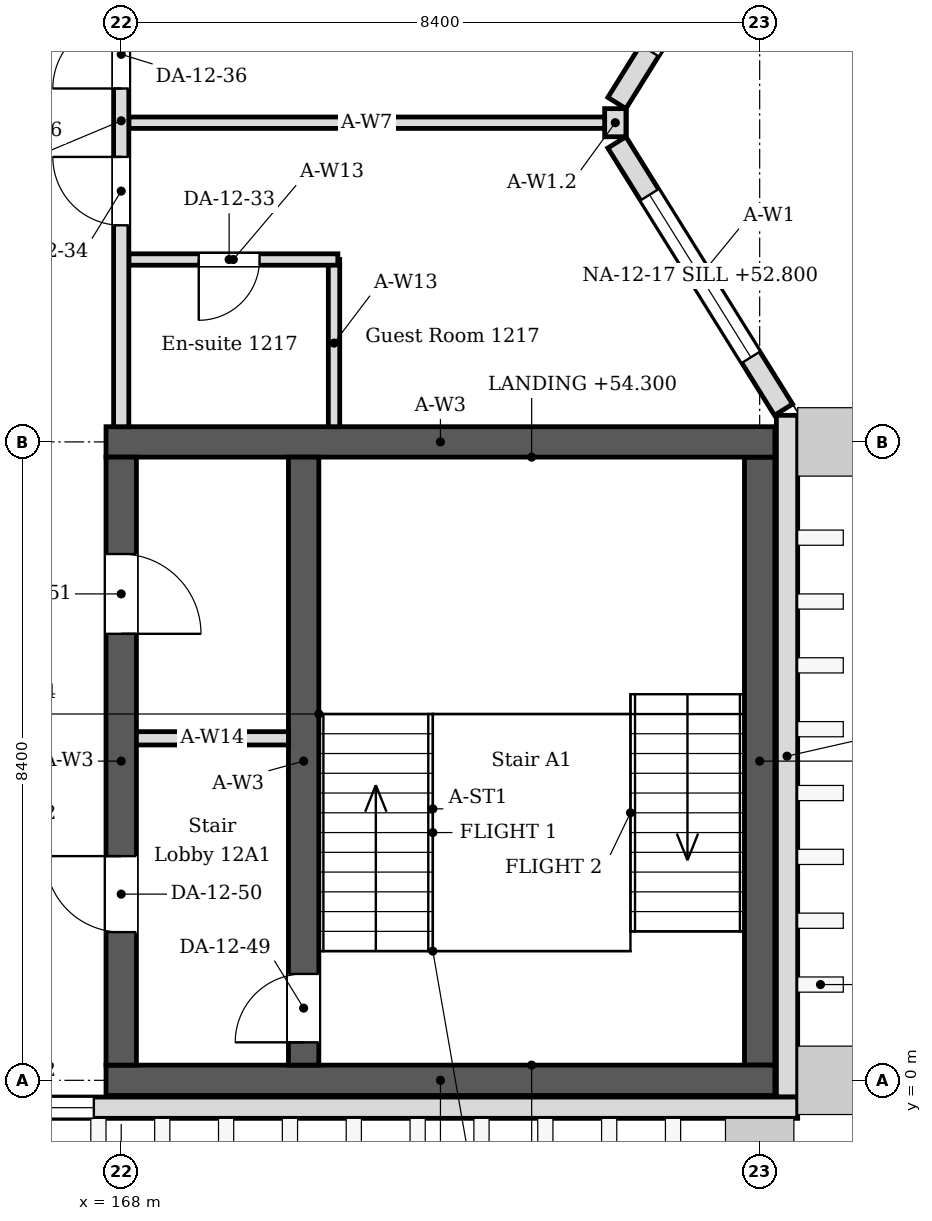
"""IFC4 building model, lengths in metres.
Left out: names, types, materials, properties, quantities, classifications, styles, units other than length and angle.
Written with IfcOpenShell. Run it as: python <this file> out.ifc"""

import sys

from ifc_helpers import new_model, si_unit, direction, frame, frame_2d, origin, place, context, subcontext, project, spatial, rectangle, extrude, element, fill, save


model = new_model("IFC4")
c1 = context("Model", 3, precision=1e-05, world=origin(), true_north=direction((0.0, 1.0)))
c2 = subcontext(c1, "Body", "Model", "MODEL_VIEW")
j1 = project(units=[si_unit("LENGTHUNIT", "METRE"), si_unit("PLANEANGLEUNIT", "RADIAN")], contexts=[c1])
p1 = place(None, origin())
s1 = spatial("IfcSite", under=j1, at=p1, CompositionType="ELEMENT")
p2 = place(p1, origin())
s2 = spatial("IfcBuilding", under=s1, at=p2, CompositionType="ELEMENT")
p3 = place(p2, frame((0.0, 0.0, 52.2)))
s3 = spatial("IfcBuildingStorey", under=s2, at=p3, CompositionType="ELEMENT", Elevation=52.2)
for number, where, z_axis, x_axis in (
    (1, (167.8, 0.0, 0.0), (0.0, 0.0, 1.0), (1.0, 0.0, 0.0)),
    (2, (167.8, 8.4, 0.0), (0.0, 0.0, 1.0), (1.0, 0.0, 0.0)),
):
    element("IfcWall", number, at=place(p3, frame(where, z_axis=z_axis, x_axis=x_axis)), inside=s3, PredefinedType="SOLIDWALL", context=c2, shape_type="SweptSolid", body=[
        extrude(rectangle(XDim=8.8, YDim=0.4, at=frame_2d((4.4, 0.0))), origin(), (0.0, 0.0, 1.0), 4.05),
    ])
p4 = place(p3, frame((168.0, 0.2, 0.0), z_axis=(0.0, 0.0, 1.0), x_axis=(0.0, 1.0, 0.0)))
e3 = element("IfcWall", 3, at=p4, inside=s3, PredefinedType="SOLIDWALL", context=c2, shape_type="SweptSolid", body=[
    extrude(rectangle(XDim=8.0, YDim=0.4, at=frame_2d((4.0, 0.0))), origin(), (0.0, 0.0, 1.0), 4.05),
])
p5 = place(p4, frame((1.75, 0.0, 0.0)))
e4 = element("IfcOpeningElement", 4, at=p5, cuts=e3, PredefinedType="OPENING", context=c2, shape_type="SweptSolid", body=[
    extrude(rectangle(XDim=1.0, YDim=2.1, at=frame_2d((0.5, 1.05))), frame((0.0, 0.21, 0.0), z_axis=(0.0, -1.0, 0.0), x_axis=(1.0, 0.0, 0.0)), (0.0, 0.0, 1.0), 0.42),
])
p6 = place(p4, frame((5.675, 0.0, 0.0)))
e5 = element("IfcOpeningElement", 5, at=p6, cuts=e3, PredefinedType="OPENING", context=c2, shape_type="SweptSolid", body=[
    extrude(rectangle(XDim=1.05, YDim=2.1, at=frame_2d((0.525, 1.05))), frame((0.0, 0.21, 0.0), z_axis=(0.0, -1.0, 0.0), x_axis=(1.0, 0.0, 0.0)), (0.0, 0.0, 1.0), 0.42),
])
p7 = place(p3, frame((176.4, 0.2, 0.0), z_axis=(0.0, 0.0, 1.0), x_axis=(0.0, 1.0, 0.0)))
e6 = element("IfcWall", 6, at=p7, inside=s3, PredefinedType="SOLIDWALL", context=c2, shape_type="SweptSolid", body=[
    extrude(rectangle(XDim=8.0, YDim=0.4, at=frame_2d((4.0, 0.0))), origin(), (0.0, 0.0, 1.0), 4.05),
])
p8 = place(p3, frame((176.76, -0.22, 0.0), z_axis=(0.0, 0.0, 1.0), x_axis=(0.0, 1.0, 0.0)))
e7 = element("IfcWall", 7, at=p8, inside=s3, PredefinedType="SOLIDWALL", context=c2, shape_type="SweptSolid", body=[
    extrude(rectangle(XDim=8.97, YDim=0.28, at=frame_2d((4.485, 0.0))), origin(), (0.0, 0.0, 1.0), 4.05),
])
p9 = place(p3, frame((176.714, 8.824, 0.0), z_axis=(0.0, 0.0, 1.0), x_axis=(-0.529018946142, 0.848610013271, 0.0)))
e8 = element("IfcWall", 8, at=p9, inside=s3, PredefinedType="SOLIDWALL", context=c2, shape_type="SweptSolid", body=[
    extrude(rectangle(XDim=4.144, YDim=0.28, at=frame_2d((2.072, 0.0))), origin(), (0.0, 0.0, 1.0), 4.05),
])
p10 = place(p9, frame((0.812, 0.0, 0.6)))
e9 = element("IfcOpeningElement", 9, at=p10, cuts=e8, PredefinedType="OPENING", context=c2, shape_type="SweptSolid", body=[
    extrude(rectangle(XDim=2.52, YDim=2.4, at=frame_2d((1.26, 1.2))), frame((0.0, 0.15, 0.0), z_axis=(0.0, -1.0, 0.0), x_axis=(1.0, 0.0, 0.0)), (0.0, 0.0, 1.0), 0.3),
])
p11 = place(p3, frame((174.521, 12.859, 0.0), z_axis=(0.0, 0.0, 1.0), x_axis=(0.528992500338, 0.848626498871, 0.0)))
e10 = element("IfcWall", 10, at=p11, inside=s3, PredefinedType="SOLIDWALL", context=c2, shape_type="SweptSolid", body=[
    extrude(rectangle(XDim=4.145, YDim=0.28, at=frame_2d((2.072, 0.0))), origin(), (0.0, 0.0, 1.0), 4.05),
])
p12 = place(p11, frame((0.812, 0.0, 0.6)))
e11 = element("IfcOpeningElement", 11, at=p12, cuts=e10, PredefinedType="OPENING", context=c2, shape_type="SweptSolid", body=[
    extrude(rectangle(XDim=2.52, YDim=2.4, at=frame_2d((1.26, 1.2))), frame((0.0, 0.15, 0.0), z_axis=(0.0, -1.0, 0.0), x_axis=(1.0, 0.0, 0.0)), (0.0, 0.0, 1.0), 0.3),
])
p13 = place(p3, frame((174.5, 12.415, 0.0), z_axis=(0.0, 0.0, 1.0), x_axis=(0.0, 1.0, 0.0)))
e12 = element("IfcWall", 12, at=p13, inside=s3, PredefinedType="SOLIDWALL", context=c2, shape_type="SweptSolid", body=[
    extrude(rectangle(XDim=0.37, YDim=0.28, at=frame_2d((0.185, 0.0))), origin(), (0.0, 0.0, 1.0), 3.604),
])
p14 = place(p3, frame((156.7, -0.36, 0.0), z_axis=(0.0, 0.0, 1.0), x_axis=(1.0, 0.0, 0.0)))
e13 = element("IfcWall", 13, at=p14, inside=s3, PredefinedType="SOLIDWALL", context=c2, shape_type="SweptSolid", body=[
    extrude(rectangle(XDim=20.2, YDim=0.28, at=frame_2d((10.1, 0.0))), origin(), (0.0, 0.0, 1.0), 4.05),
])
p15 = place(p14, frame((9.26, 0.0, 0.6)))
e14 = element("IfcOpeningElement", 14, at=p15, cuts=e13, PredefinedType="OPENING", context=c2, shape_type="SweptSolid", body=[
    extrude(rectangle(XDim=1.68, YDim=2.4, at=frame_2d((0.84, 1.2))), frame((0.0, 0.15, 0.0), z_axis=(0.0, -1.0, 0.0), x_axis=(1.0, 0.0, 0.0)), (0.0, 0.0, 1.0), 0.3),
])
p16 = place(p14, frame((3.34, 0.0, 0.6)))
e15 = element("IfcOpeningElement", 15, at=p16, cuts=e13, PredefinedType="OPENING", context=c2, shape_type="SweptSolid", body=[
    extrude(rectangle(XDim=2.52, YDim=2.4, at=frame_2d((1.26, 1.2))), frame((0.0, 0.15, 0.0), z_axis=(0.0, -1.0, 0.0), x_axis=(1.0, 0.0, 0.0)), (0.0, 0.0, 1.0), 0.3),
])
p17 = place(p3, frame((170.8, 8.6, 0.0), z_axis=(0.0, 0.0, 1.0), x_axis=(0.0, 1.0, 0.0)))
e16 = element("IfcWall", 16, at=p17, inside=s3, PredefinedType="PARTITIONING", context=c2, shape_type="SweptSolid", body=[
    extrude(rectangle(XDim=2.2, YDim=0.15, at=frame_2d((1.1, 0.0))), origin(), (0.0, 0.0, 1.0), 4.05),
])
p18 = place(p3, frame((170.85, 10.8, 0.0), z_axis=(0.0, 0.0, 1.0), x_axis=(-1.0, 0.0, 0.0)))
e17 = element("IfcWall", 17, at=p18, inside=s3, PredefinedType="PARTITIONING", context=c2, shape_type="SweptSolid", body=[
    extrude(rectangle(XDim=2.75, YDim=0.15, at=frame_2d((1.375, 0.0))), origin(), (0.0, 0.0, 1.0), 4.05),
])
p19 = place(p18, frame((1.03, 0.0, 0.0)))
e18 = element("IfcOpeningElement", 18, at=p19, cuts=e17, PredefinedType="OPENING", context=c2, shape_type="SweptSolid", body=[
    extrude(rectangle(XDim=0.8, YDim=2.1, at=frame_2d((0.4, 1.05))), frame((0.0, 0.085, 0.0), z_axis=(0.0, -1.0, 0.0), x_axis=(1.0, 0.0, 0.0)), (0.0, 0.0, 1.0), 0.17),
])
p20 = place(p3, frame((168.1, 12.6, 0.0), z_axis=(0.0, 0.0, 1.0), x_axis=(1.0, 0.0, 0.0)))
e19 = element("IfcWall", 19, at=p20, inside=s3, PredefinedType="PARTITIONING", context=c2, shape_type="SweptSolid", body=[
    extrude(rectangle(XDim=6.26, YDim=0.15, at=frame_2d((3.13, 0.0))), origin(), (0.0, 0.0, 1.0), 3.604),
])
p21 = place(p3, frame((168.0, 8.6, 0.0), z_axis=(0.0, 0.0, 1.0), x_axis=(0.0, 1.0, 0.0)))
e20 = element("IfcWall", 20, at=p21, inside=s3, PredefinedType="PARTITIONING", context=c2, shape_type="SweptSolid", body=[
    extrude(rectangle(XDim=8.05, YDim=0.2, at=frame_2d((4.025, 0.0))), origin(), (0.0, 0.0, 1.0), 3.45),
])
p22 = place(p21, frame((2.65, 0.0, 0.0)))
e21 = element("IfcOpeningElement", 21, at=p22, cuts=e20, PredefinedType="OPENING", context=c2, shape_type="SweptSolid", body=[
    extrude(rectangle(XDim=0.9, YDim=2.1, at=frame_2d((0.45, 1.05))), frame((0.0, 0.11, 0.0), z_axis=(0.0, -1.0, 0.0), x_axis=(1.0, 0.0, 0.0)), (0.0, 0.0, 1.0), 0.22),
])
p23 = place(p21, frame((4.45, 0.0, 0.0)))
e22 = element("IfcOpeningElement", 22, at=p23, cuts=e20, PredefinedType="OPENING", context=c2, shape_type="SweptSolid", body=[
    extrude(rectangle(XDim=0.9, YDim=2.1, at=frame_2d((0.45, 1.05))), frame((0.0, 0.11, 0.0), z_axis=(0.0, -1.0, 0.0), x_axis=(1.0, 0.0, 0.0)), (0.0, 0.0, 1.0), 0.22),
])
p24 = place(p3, frame((170.4, 0.2, 0.0), z_axis=(0.0, 0.0, 1.0), x_axis=(0.0, 1.0, 0.0)))
e23 = element("IfcWall", 23, at=p24, inside=s3, PredefinedType="SOLIDWALL", context=c2, shape_type="SweptSolid", body=[
    extrude(rectangle(XDim=8.0, YDim=0.4, at=frame_2d((4.0, 0.0))), origin(), (0.0, 0.0, 1.0), 4.05),
])
p25 = place(p24, frame((0.3, 0.0, 0.0)))
e24 = element("IfcOpeningElement", 24, at=p25, cuts=e23, PredefinedType="OPENING", context=c2, shape_type="SweptSolid", body=[
    extrude(rectangle(XDim=0.9, YDim=2.1, at=frame_2d((0.45, 1.05))), frame((0.0, 0.21, 0.0), z_axis=(0.0, -1.0, 0.0), x_axis=(1.0, 0.0, 0.0)), (0.0, 0.0, 1.0), 0.42),
])
p26 = place(p3, frame((168.2, 4.5, 0.0), z_axis=(0.0, 0.0, 1.0), x_axis=(1.0, 0.0, 0.0)))
e25 = element("IfcWall", 25, at=p26, inside=s3, PredefinedType="PARTITIONING", context=c2, shape_type="SweptSolid", body=[
    extrude(rectangle(XDim=2.0, YDim=0.175, at=frame_2d((1.0, 0.0))), origin(), (0.0, 0.0, 1.0), 4.05),
])
p27 = place(p10, origin())
e26 = element("IfcWindow", 26, at=p27, inside=s3, PartitioningType="SINGLE_PANEL", PredefinedType="WINDOW", context=c2, shape_type="SweptSolid", body=[
    extrude(rectangle(XDim=2.52, YDim=2.4, at=frame_2d((1.26, 1.2))), frame((0.0, 0.03, 0.0), z_axis=(0.0, -1.0, 0.0), x_axis=(1.0, 0.0, 0.0)), (0.0, 0.0, 1.0), 0.06),
])
fill(e9, e26)
p28 = place(p15, origin())
e27 = element("IfcWindow", 27, at=p28, inside=s3, PartitioningType="SINGLE_PANEL", PredefinedType="WINDOW", context=c2, shape_type="SweptSolid", body=[
    extrude(rectangle(XDim=1.68, YDim=2.4, at=frame_2d((0.84, 1.2))), frame((0.0, 0.03, 0.0), z_axis=(0.0, -1.0, 0.0), x_axis=(1.0, 0.0, 0.0)), (0.0, 0.0, 1.0), 0.06),
])
fill(e14, e27)
p29 = place(p19, origin())
e28 = element("IfcDoor", 28, at=p29, inside=s3, OperationType="SINGLE_SWING_RIGHT", PredefinedType="DOOR", context=c2, shape_type="SweptSolid", body=[
    extrude(rectangle(XDim=0.8, YDim=2.1, at=frame_2d((0.4, 1.05))), frame((0.0, 0.025, 0.0), z_axis=(0.0, -1.0, 0.0), x_axis=(1.0, 0.0, 0.0)), (0.0, 0.0, 1.0), 0.05),
])
fill(e18, e28)
p30 = place(p22, origin())
e29 = element("IfcDoor", 29, at=p30, inside=s3, OperationType="SINGLE_SWING_RIGHT", PredefinedType="DOOR", context=c2, shape_type="SweptSolid", body=[
    extrude(rectangle(XDim=0.9, YDim=2.1, at=frame_2d((0.45, 1.05))), frame((0.0, 0.025, 0.0), z_axis=(0.0, -1.0, 0.0), x_axis=(1.0, 0.0, 0.0)), (0.0, 0.0, 1.0), 0.05),
])
fill(e21, e29)
p31 = place(p23, origin())
e30 = element("IfcDoor", 30, at=p31, inside=s3, OperationType="SINGLE_SWING_LEFT", PredefinedType="DOOR", context=c2, shape_type="SweptSolid", body=[
    extrude(rectangle(XDim=0.9, YDim=2.1, at=frame_2d((0.45, 1.05))), frame((0.0, 0.025, 0.0), z_axis=(0.0, -1.0, 0.0), x_axis=(1.0, 0.0, 0.0)), (0.0, 0.0, 1.0), 0.05),
])
fill(e22, e30)
p32 = place(p25, origin())
e31 = element("IfcDoor", 31, at=p32, inside=s3, OperationType="SINGLE_SWING_LEFT", PredefinedType="DOOR", context=c2, shape_type="SweptSolid", body=[
    extrude(rectangle(XDim=0.9, YDim=2.1, at=frame_2d((0.45, 1.05))), frame((0.0, 0.025, 0.0), z_axis=(0.0, -1.0, 0.0), x_axis=(1.0, 0.0, 0.0)), (0.0, 0.0, 1.0), 0.05),
])
fill(e24, e31)
p33 = place(p5, origin())
e32 = element("IfcDoor", 32, at=p33, inside=s3, OperationType="SINGLE_SWING_RIGHT", PredefinedType="DOOR", context=c2, shape_type="SweptSolid", body=[
    extrude(rectangle(XDim=1.0, YDim=2.1, at=frame_2d((0.5, 1.05))), frame((0.0, 0.025, 0.0), z_axis=(0.0, -1.0, 0.0), x_axis=(1.0, 0.0, 0.0)), (0.0, 0.0, 1.0), 0.05),
])
fill(e4, e32)
p34 = place(p6, origin())
e33 = element("IfcDoor", 33, at=p34, inside=s3, OperationType="SINGLE_SWING_LEFT", PredefinedType="DOOR", context=c2, shape_type="SweptSolid", body=[
    extrude(rectangle(XDim=1.05, YDim=2.1, at=frame_2d((0.525, 1.05))), frame((0.0, 0.025, 0.0), z_axis=(0.0, -1.0, 0.0), x_axis=(1.0, 0.0, 0.0)), (0.0, 0.0, 1.0), 0.05),
])
fill(e5, e33)
save(model, sys.argv[1])
